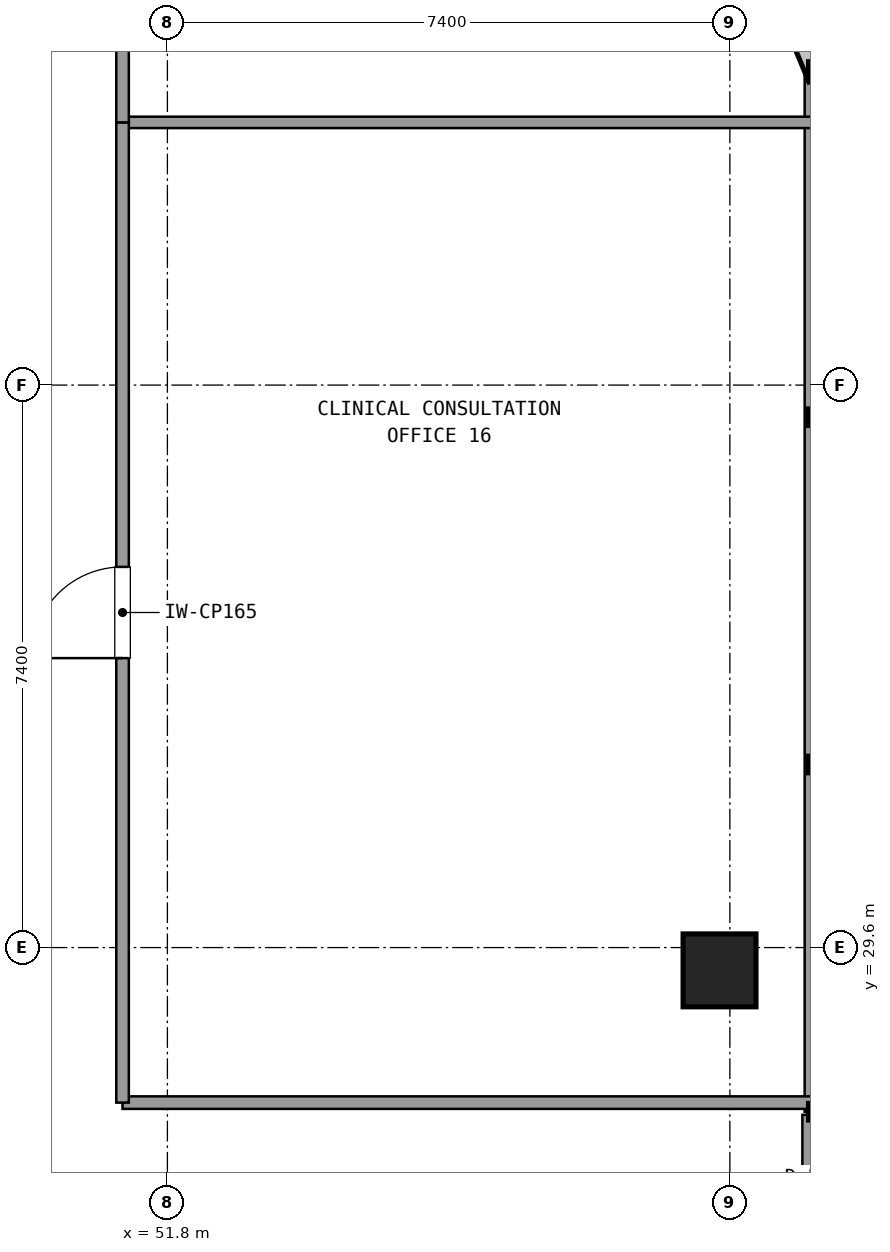
"""IFC4 building model, lengths in metres.
Left out: names, types, materials, properties, quantities, classifications, styles, units other than length and angle.
Written with IfcOpenShell. Run it as: python <this file> out.ifc"""

import sys

from ifc_helpers import new_model, si_unit, direction, frame, frame_2d, origin, origin_2d, place, context, subcontext, project, spatial, rectangle, extrude, element, fill, save


model = new_model("IFC4")
c1 = context("Model", 3, precision=1e-05, world=origin(), true_north=direction((0.0, 1.0)))
c2 = subcontext(c1, "Body", "Model", "MODEL_VIEW")
j1 = project(units=[si_unit("LENGTHUNIT", "METRE"), si_unit("PLANEANGLEUNIT", "RADIAN")], contexts=[c1])
p1 = place(None, origin())
s1 = spatial("IfcSite", under=j1, at=p1, CompositionType="ELEMENT")
p2 = place(p1, origin())
s2 = spatial("IfcBuilding", under=s1, at=p2, CompositionType="ELEMENT")
p3 = place(p2, frame((0.0, 0.0, 156.42)))
s3 = spatial("IfcBuildingStorey", under=s2, at=p3, CompositionType="ELEMENT", Elevation=156.42)
p4 = place(p3, frame((59.064, 29.3, 0.0), z_axis=(0.0, 0.0, 1.0), x_axis=(1.0, 0.0, 0.0)))
e1 = element("IfcColumn", 1, at=p4, inside=s3, PredefinedType="COLUMN", context=c2, shape_type="SweptSolid", body=[
    extrude(rectangle(XDim=0.96, YDim=0.96, at=origin_2d()), origin(), (0.0, 0.0, 1.0), 3.6),
])
p5 = place(p3, frame((60.304, 24.4, 0.0), z_axis=(0.0, 0.0, 1.0), x_axis=(0.0, 1.0, 0.0)))
e2 = element("IfcWall", 2, at=p5, inside=s3, PredefinedType="SOLIDWALL", context=c2, shape_type="SweptSolid", body=[
    extrude(rectangle(XDim=3.0, YDim=0.3, at=frame_2d((1.5, 0.0))), origin(), (0.0, 0.0, 1.0), 2.67),
])
p6 = place(p5, frame((0.9, 0.0, 0.0)))
e3 = element("IfcOpeningElement", 3, at=p6, cuts=e2, PredefinedType="OPENING", context=c2, shape_type="SweptSolid", body=[
    extrude(rectangle(XDim=1.2, YDim=2.2, at=frame_2d((0.6, 1.1))), frame((0.0, 0.16, 0.0), z_axis=(0.0, -1.0, 0.0), x_axis=(1.0, 0.0, 0.0)), (0.0, 0.0, 1.0), 0.32),
])
p7 = place(p3, frame((60.304, 27.44, 0.0), z_axis=(0.0, 0.0, 1.0), x_axis=(0.0, 1.0, 0.0)))
e4 = element("IfcWall", 4, at=p7, inside=s3, PredefinedType="SOLIDWALL", context=c2, shape_type="SweptSolid", body=[
    extrude(rectangle(XDim=13.705, YDim=0.24, at=frame_2d((6.853, 0.0))), origin(), (0.0, 0.0, 1.0), 0.85),
])
p8 = place(p3, frame((51.21, 27.56, 0.0), z_axis=(0.0, 0.0, 1.0), x_axis=(1.0, 0.0, 0.0)))
e5 = element("IfcWall", 5, at=p8, inside=s3, PredefinedType="PARTITIONING", context=c2, shape_type="SweptSolid", body=[
    extrude(rectangle(XDim=9.074, YDim=0.165, at=frame_2d((4.537, 0.0))), origin(), (0.0, 0.0, 1.0), 2.61),
])
p9 = place(p3, frame((51.21, 40.456, 0.0), z_axis=(0.0, 0.0, 1.0), x_axis=(1.0, 0.0, 0.0)))
e6 = element("IfcWall", 6, at=p9, inside=s3, PredefinedType="PARTITIONING", context=c2, shape_type="SweptSolid", body=[
    extrude(rectangle(XDim=9.074, YDim=0.15, at=frame_2d((4.537, 0.0))), origin(), (0.0, 0.0, 1.0), 2.61),
])
p10 = place(p3, frame((51.21, 27.56, 0.0), z_axis=(0.0, 0.0, 1.0), x_axis=(0.0, 1.0, 0.0)))
e7 = element("IfcWall", 7, at=p10, inside=s3, PredefinedType="PARTITIONING", context=c2, shape_type="SweptSolid", body=[
    extrude(rectangle(XDim=12.896, YDim=0.165, at=frame_2d((6.448, 0.0))), origin(), (0.0, 0.0, 1.0), 2.61),
])
p11 = place(p10, frame((5.848, 0.0, 0.0)))
e8 = element("IfcOpeningElement", 8, at=p11, cuts=e7, PredefinedType="OPENING", context=c2, shape_type="SweptSolid", body=[
    extrude(rectangle(XDim=1.2, YDim=2.15, at=frame_2d((0.6, 1.075))), frame((0.0, 0.093, 0.0), z_axis=(0.0, -1.0, 0.0), x_axis=(1.0, 0.0, 0.0)), (0.0, 0.0, 1.0), 0.185),
])
p12 = place(p3, frame((51.21, 40.456, 0.0), z_axis=(0.0, 0.0, 1.0), x_axis=(0.0, 1.0, 0.0)))
e9 = element("IfcWall", 9, at=p12, inside=s3, PredefinedType="PARTITIONING", context=c2, shape_type="SweptSolid", body=[
    extrude(rectangle(XDim=6.644, YDim=0.165, at=frame_2d((3.322, 0.0))), origin(), (0.0, 0.0, 1.0), 2.61),
])
p13 = place(p12, frame((2.722, 0.0, 0.0)))
e10 = element("IfcOpeningElement", 10, at=p13, cuts=e9, PredefinedType="OPENING", context=c2, shape_type="SweptSolid", body=[
    extrude(rectangle(XDim=1.2, YDim=2.15, at=frame_2d((0.6, 1.075))), frame((0.0, 0.093, 0.0), z_axis=(0.0, -1.0, 0.0), x_axis=(1.0, 0.0, 0.0)), (0.0, 0.0, 1.0), 0.185),
])
p14 = place(p11, origin())
e11 = element("IfcDoor", 11, at=p14, inside=s3, OperationType="SINGLE_SWING_LEFT", PredefinedType="DOOR", context=c2, shape_type="SweptSolid", body=[
    extrude(rectangle(XDim=1.2, YDim=2.15, at=frame_2d((0.6, 1.075))), frame((0.0, 0.025, 0.0), z_axis=(0.0, -1.0, 0.0), x_axis=(1.0, 0.0, 0.0)), (0.0, 0.0, 1.0), 0.05),
])
fill(e8, e11)
save(model, sys.argv[1])
